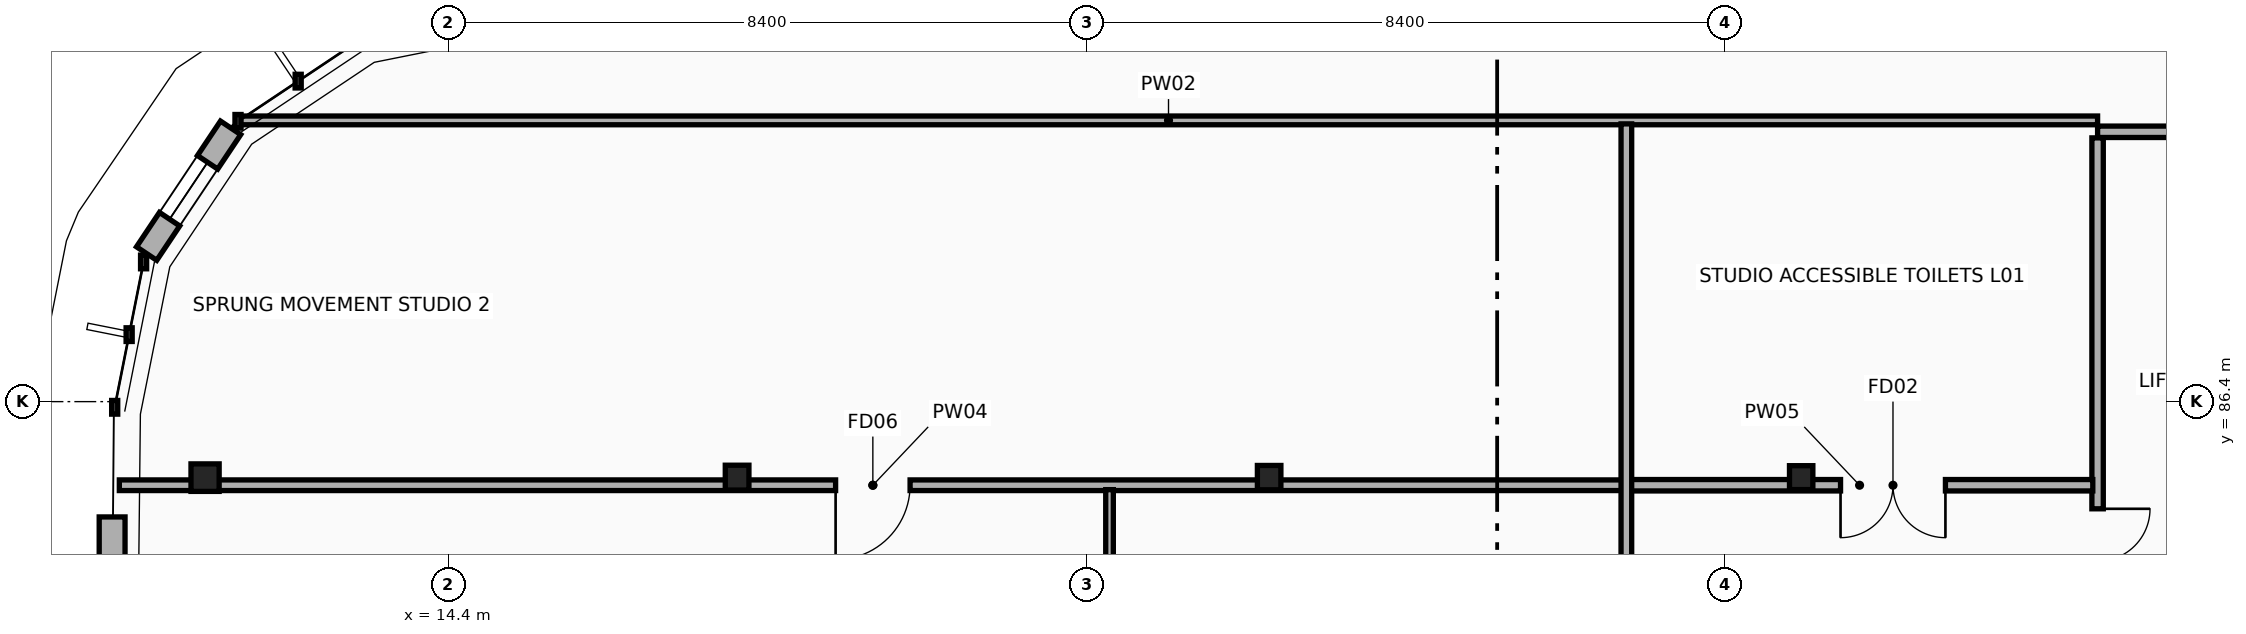
"""IFC4 building model, lengths in metres.
Left out: names, types, materials, properties, quantities, classifications, styles, units other than length and angle.
Written with IfcOpenShell. Run it as: python <this file> out.ifc"""

import sys

from ifc_helpers import new_model, si_unit, direction, frame, frame_2d, origin, origin_2d, place, context, subcontext, project, spatial, rectangle, i_section, extrude, element, fill, save


model = new_model("IFC4")
c1 = context("Model", 3, precision=1e-05, world=origin(), true_north=direction((0.0, 1.0)))
c2 = subcontext(c1, "Body", "Model", "MODEL_VIEW")
j1 = project(units=[si_unit("LENGTHUNIT", "METRE"), si_unit("PLANEANGLEUNIT", "RADIAN")], contexts=[c1])
p1 = place(None, origin())
s1 = spatial("IfcSite", under=j1, at=p1, CompositionType="ELEMENT")
p2 = place(p1, origin())
s2 = spatial("IfcBuilding", under=s1, at=p2, CompositionType="ELEMENT")
p3 = place(p2, frame((0.0, 0.0, 4.8)))
s3 = spatial("IfcBuildingStorey", under=s2, at=p3, CompositionType="ELEMENT", Elevation=4.8)
p4 = place(p3, frame((11.2, 85.4, 0.0), z_axis=(0.0, 0.0, 1.0), x_axis=(1.0, 0.0, 0.0)))
e1 = element("IfcColumn", 1, at=p4, inside=s3, PredefinedType="COLUMN", context=c2, shape_type="SweptSolid", body=[
    extrude(i_section(OverallWidth=0.371, OverallDepth=0.362, WebThickness=0.012, FlangeThickness=0.021, at=origin_2d()), origin(), (0.0, 0.0, 1.0), 3.9),
])
p5 = place(p3, frame((18.2, 85.4, 0.0), z_axis=(0.0, 0.0, 1.0), x_axis=(1.0, 0.0, 0.0)))
e2 = element("IfcColumn", 2, at=p5, inside=s3, PredefinedType="COLUMN", context=c2, shape_type="SweptSolid", body=[
    extrude(i_section(OverallWidth=0.311, OverallDepth=0.327, WebThickness=0.016, FlangeThickness=0.025, at=origin_2d()), origin(), (0.0, 0.0, 1.0), 3.9),
])
p6 = place(p3, frame((25.2, 85.4, 0.0), z_axis=(0.0, 0.0, 1.0), x_axis=(1.0, 0.0, 0.0)))
e3 = element("IfcColumn", 3, at=p6, inside=s3, PredefinedType="COLUMN", context=c2, shape_type="SweptSolid", body=[
    extrude(i_section(OverallWidth=0.309, OverallDepth=0.321, WebThickness=0.014, FlangeThickness=0.022, at=origin_2d()), origin(), (0.0, 0.0, 1.0), 3.9),
])
p7 = place(p3, frame((32.2, 85.4, 0.0), z_axis=(0.0, 0.0, 1.0), x_axis=(1.0, 0.0, 0.0)))
e4 = element("IfcColumn", 4, at=p7, inside=s3, PredefinedType="COLUMN", context=c2, shape_type="SweptSolid", body=[
    extrude(i_section(OverallWidth=0.307, OverallDepth=0.314, WebThickness=0.012, FlangeThickness=0.019, at=origin_2d()), origin(), (0.0, 0.0, 1.0), 3.9),
])
p8 = place(p3, frame((10.431, 88.348, 0.0), z_axis=(0.0, 0.0, 1.0), x_axis=(0.555492993171, 0.83152121713, 0.0)))
e5 = element("IfcWall", 5, at=p8, inside=s3, PredefinedType="STANDARD", context=c2, shape_type="SweptSolid", body=[
    extrude(rectangle(XDim=1.989, YDim=0.32, at=frame_2d((0.995, 0.0))), origin(), (0.0, 0.0, 1.0), 3.188),
])
p9 = place(p8, frame((0.544, 0.0, 0.9)))
e6 = element("IfcOpeningElement", 6, at=p9, cuts=e5, PredefinedType="OPENING", context=c2, shape_type="SweptSolid", body=[
    extrude(rectangle(XDim=0.9, YDim=1.2, at=frame_2d((0.45, 0.6))), frame((0.0, 0.17, 0.0), z_axis=(0.0, -1.0, 0.0), x_axis=(1.0, 0.0, 0.0)), (0.0, 0.0, 1.0), 0.34),
])
p10 = place(p3, frame((9.977, 83.517, 0.0), z_axis=(0.0, 0.0, 1.0), x_axis=(0.0, 1.0, 0.0)))
e7 = element("IfcWall", 7, at=p10, inside=s3, PredefinedType="STANDARD", context=c2, shape_type="SweptSolid", body=[
    extrude(rectangle(XDim=1.366, YDim=0.34, at=frame_2d((0.683, 0.0))), origin(), (0.0, 0.0, 1.0), 3.612),
])
p11 = place(p3, frame((40.453, 89.95, 0.0), z_axis=(0.0, 0.0, 1.0), x_axis=(-1.0, 0.0, 0.0)))
e8 = element("IfcWall", 8, at=p11, inside=s3, PredefinedType="PARTITIONING", context=c2, shape_type="SweptSolid", body=[
    extrude(rectangle(XDim=4.353, YDim=0.15, at=frame_2d((2.176, 0.0))), origin(), (0.0, 0.0, 1.0), 3.188),
])
p12 = place(p3, frame((36.1, 89.87, 0.0), z_axis=(0.0, 0.0, 1.0), x_axis=(0.0, -1.0, 0.0)))
e9 = element("IfcWall", 9, at=p12, inside=s3, PredefinedType="PARTITIONING", context=c2, shape_type="SweptSolid", body=[
    extrude(rectangle(XDim=11.14, YDim=0.15, at=frame_2d((5.57, 0.0))), origin(), (0.0, 0.0, 1.0), 3.185),
])
p13 = place(p12, frame((4.88, 0.0, 0.0)))
e10 = element("IfcOpeningElement", 10, at=p13, cuts=e9, PredefinedType="OPENING", context=c2, shape_type="SweptSolid", body=[
    extrude(rectangle(XDim=1.38, YDim=2.2, at=frame_2d((0.69, 1.1))), frame((0.0, 0.085, 0.0), z_axis=(0.0, -1.0, 0.0), x_axis=(1.0, 0.0, 0.0)), (0.0, 0.0, 1.0), 0.17),
])
p14 = place(p3, frame((29.9, 85.3, 0.0), z_axis=(0.0, 0.0, 1.0), x_axis=(-1.0, 0.0, 0.0)))
e11 = element("IfcWall", 11, at=p14, inside=s3, PredefinedType="PARTITIONING", context=c2, shape_type="SweptSolid", body=[
    extrude(rectangle(XDim=19.828, YDim=0.14, at=frame_2d((9.914, 0.0))), origin(), (0.0, 0.0, 1.0), 3.151),
])
p15 = place(p14, frame((9.424, 0.0, 0.0)))
e12 = element("IfcOpeningElement", 12, at=p15, cuts=e11, PredefinedType="OPENING", context=c2, shape_type="SweptSolid", body=[
    extrude(rectangle(XDim=0.98, YDim=2.12, at=frame_2d((0.49, 1.06))), frame((0.0, 0.08, 0.0), z_axis=(0.0, -1.0, 0.0), x_axis=(1.0, 0.0, 0.0)), (0.0, 0.0, 1.0), 0.16),
])
p16 = place(p3, frame((36.037, 85.3, 0.0), z_axis=(0.0, 0.0, 1.0), x_axis=(-1.0, 0.0, 0.0)))
e13 = element("IfcWall", 13, at=p16, inside=s3, PredefinedType="PARTITIONING", context=c2, shape_type="SweptSolid", body=[
    extrude(rectangle(XDim=6.137, YDim=0.15, at=frame_2d((3.069, 0.0))), origin(), (0.0, 0.0, 1.0), 3.185),
])
p17 = place(p16, frame((1.939, 0.0, 0.0)))
e14 = element("IfcOpeningElement", 14, at=p17, cuts=e13, PredefinedType="OPENING", context=c2, shape_type="SweptSolid", body=[
    extrude(rectangle(XDim=1.38, YDim=2.2, at=frame_2d((0.69, 1.1))), frame((0.0, 0.085, 0.0), z_axis=(0.0, -1.0, 0.0), x_axis=(1.0, 0.0, 0.0)), (0.0, 0.0, 1.0), 0.17),
])
p18 = place(p3, frame((23.1, 75.665, 0.0), z_axis=(0.0, 0.0, 1.0), x_axis=(0.0, 1.0, 0.0)))
e15 = element("IfcWall", 15, at=p18, inside=s3, PredefinedType="PARTITIONING", context=c2, shape_type="SweptSolid", body=[
    extrude(rectangle(XDim=9.577, YDim=0.1, at=frame_2d((4.789, 0.0))), origin(), (0.0, 0.0, 1.0), 3.185),
])
p19 = place(p3, frame((11.652, 90.1, 0.0), z_axis=(0.0, 0.0, 1.0), x_axis=(1.0, 0.0, 0.0)))
e16 = element("IfcWall", 16, at=p19, inside=s3, PredefinedType="PARTITIONING", context=c2, shape_type="SweptSolid", body=[
    extrude(rectangle(XDim=24.448, YDim=0.115, at=frame_2d((12.224, 0.0))), origin(), (0.0, 0.0, 1.0), 3.188),
])
p20 = place(p3, frame((29.9, 82.35, 0.0), z_axis=(0.0, 0.0, 1.0), x_axis=(0.0, 1.0, 0.0)))
e17 = element("IfcWall", 17, at=p20, inside=s3, PredefinedType="PARTITIONING", context=c2, shape_type="SweptSolid", body=[
    extrude(rectangle(XDim=7.704, YDim=0.14, at=frame_2d((3.852, 0.0))), origin(), (0.0, 0.0, 1.0), 3.185),
])
p21 = place(p9, origin())
e18 = element("IfcWindow", 18, at=p21, inside=s3, PartitioningType="SINGLE_PANEL", PredefinedType="WINDOW", context=c2, shape_type="SweptSolid", body=[
    extrude(rectangle(XDim=0.9, YDim=1.2, at=frame_2d((0.45, 0.6))), frame((0.0, 0.03, 0.0), z_axis=(0.0, -1.0, 0.0), x_axis=(1.0, 0.0, 0.0)), (0.0, 0.0, 1.0), 0.06),
])
fill(e6, e18)
p22 = place(p13, origin())
e19 = element("IfcDoor", 19, at=p22, inside=s3, OperationType="DOUBLE_DOOR_SINGLE_SWING", PredefinedType="DOOR", context=c2, shape_type="SweptSolid", body=[
    extrude(rectangle(XDim=1.38, YDim=2.2, at=frame_2d((0.69, 1.1))), frame((0.0, 0.025, 0.0), z_axis=(0.0, -1.0, 0.0), x_axis=(1.0, 0.0, 0.0)), (0.0, 0.0, 1.0), 0.05),
])
fill(e10, e19)
p23 = place(p15, origin())
e20 = element("IfcDoor", 20, at=p23, inside=s3, OperationType="SINGLE_SWING_RIGHT", PredefinedType="DOOR", context=c2, shape_type="SweptSolid", body=[
    extrude(rectangle(XDim=0.98, YDim=2.12, at=frame_2d((0.49, 1.06))), frame((0.0, 0.025, 0.0), z_axis=(0.0, -1.0, 0.0), x_axis=(1.0, 0.0, 0.0)), (0.0, 0.0, 1.0), 0.05),
])
fill(e12, e20)
p24 = place(p17, origin())
e21 = element("IfcDoor", 21, at=p24, inside=s3, OperationType="DOUBLE_DOOR_SINGLE_SWING", PredefinedType="DOOR", context=c2, shape_type="SweptSolid", body=[
    extrude(rectangle(XDim=1.38, YDim=2.2, at=frame_2d((0.69, 1.1))), frame((0.0, 0.025, 0.0), z_axis=(0.0, -1.0, 0.0), x_axis=(1.0, 0.0, 0.0)), (0.0, 0.0, 1.0), 0.05),
])
fill(e14, e21)
save(model, sys.argv[1])
